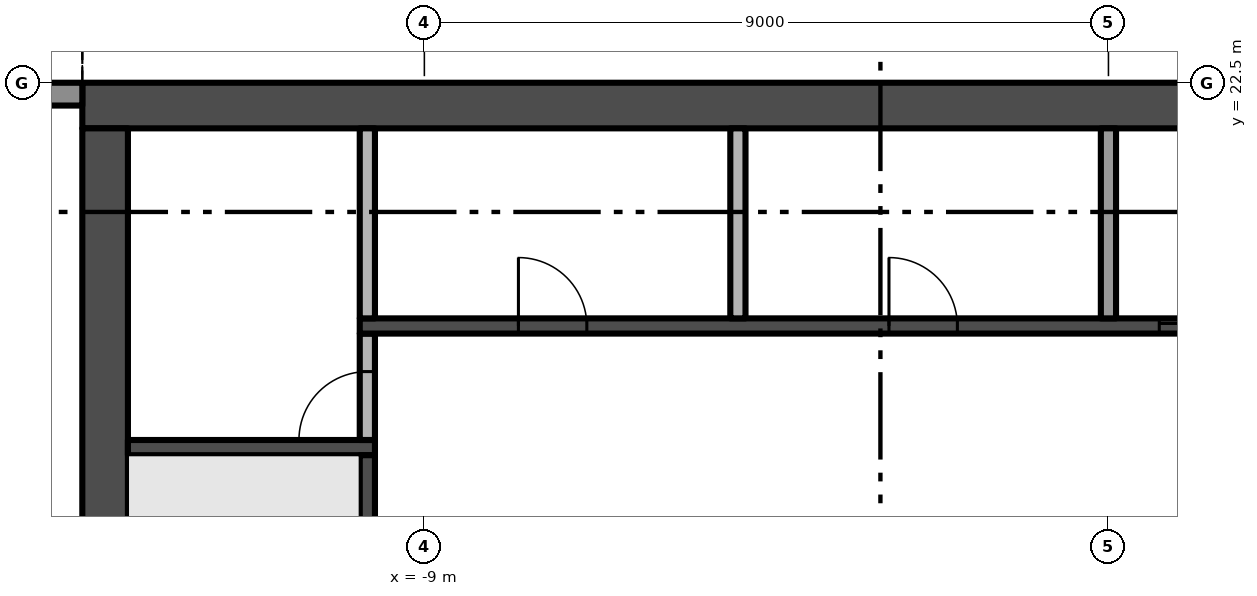
"""IFC4 building model, lengths in metres.
Left out: names, types, materials, properties, quantities, classifications, styles, units other than length and angle.
Written with IfcOpenShell. Run it as: python <this file> out.ifc"""

import sys

from ifc_helpers import new_model, si_unit, direction, frame, frame_2d, origin, place, context, subcontext, project, spatial, rectangle, extrude, element, fill, save


model = new_model("IFC4")
c1 = context("Model", 3, precision=1e-05, world=origin(), true_north=direction((0.0, 1.0)))
c2 = subcontext(c1, "Body", "Model", "MODEL_VIEW")
j1 = project(units=[si_unit("LENGTHUNIT", "METRE"), si_unit("PLANEANGLEUNIT", "RADIAN")], contexts=[c1])
p1 = place(None, origin())
s1 = spatial("IfcSite", under=j1, at=p1, CompositionType="ELEMENT")
p2 = place(p1, origin())
s2 = spatial("IfcBuilding", under=s1, at=p2, CompositionType="ELEMENT")
p3 = place(p2, frame((0.0, 0.0, 207.2)))
s3 = spatial("IfcBuildingStorey", under=s2, at=p3, CompositionType="ELEMENT", Elevation=207.2)
p4 = place(p3, frame((13.5, 22.2, -0.3), z_axis=(0.0, 0.0, 1.0), x_axis=(-1.0, 0.0, 0.0)))
e1 = element("IfcWall", 1, at=p4, inside=s3, PredefinedType="SHEAR", context=c2, shape_type="SweptSolid", body=[
    extrude(rectangle(XDim=27.0, YDim=0.6, at=frame_2d((13.5, 0.0))), origin(), (0.0, 0.0, 1.0), 3.8),
])
p5 = place(p3, frame((-13.2, 21.9, -0.3), z_axis=(0.0, 0.0, 1.0), x_axis=(0.0, -1.0, 0.0)))
e2 = element("IfcWall", 2, at=p5, inside=s3, PredefinedType="SHEAR", context=c2, shape_type="SweptSolid", body=[
    extrude(rectangle(XDim=16.8, YDim=0.6, at=frame_2d((8.4, 0.0))), origin(), (0.0, 0.0, 1.0), 3.8),
])
p6 = place(p5, frame((9.3, 0.0, 0.3)))
e3 = element("IfcOpeningElement", 3, at=p6, cuts=e2, PredefinedType="OPENING", context=c2, shape_type="SweptSolid", body=[
    extrude(rectangle(XDim=1.2, YDim=2.2, at=frame_2d((0.6, 1.1))), frame((0.0, 0.31, 0.0), z_axis=(0.0, -1.0, 0.0), x_axis=(1.0, 0.0, 0.0)), (0.0, 0.0, 1.0), 0.62),
])
p7 = place(p3, frame((-17.5, 22.35, 0.0), z_axis=(0.0, 0.0, 1.0), x_axis=(1.0, 0.0, 0.0)))
e4 = element("IfcWall", 4, at=p7, inside=s3, PredefinedType="SOLIDWALL", context=c2, shape_type="SweptSolid", body=[
    extrude(rectangle(XDim=4.0, YDim=0.3, at=frame_2d((2.0, 0.0))), origin(), (0.0, 0.0, 1.0), 3.5),
])
p8 = place(p7, frame((0.3, 0.0, 0.45)))
e5 = element("IfcOpeningElement", 5, at=p8, cuts=e4, PredefinedType="OPENING", context=c2, shape_type="SweptSolid", body=[
    extrude(rectangle(XDim=3.075, YDim=2.65, at=frame_2d((1.538, 1.325))), frame((0.0, 0.16, 0.0), z_axis=(0.0, -1.0, 0.0), x_axis=(1.0, 0.0, 0.0)), (0.0, 0.0, 1.0), 0.32),
])
p9 = place(p3, frame((-12.9, 17.7, 0.0), z_axis=(0.0, 0.0, 1.0), x_axis=(1.0, 0.0, 0.0)))
e6 = element("IfcWall", 6, at=p9, inside=s3, PredefinedType="SHEAR", context=c2, shape_type="SweptSolid", body=[
    extrude(rectangle(XDim=3.25, YDim=0.2, at=frame_2d((1.625, 0.0))), origin(), (0.0, 0.0, 1.0), 3.5),
])
p10 = place(p3, frame((-9.75, 16.1, 0.0), z_axis=(0.0, 0.0, 1.0), x_axis=(0.0, 1.0, 0.0)))
e7 = element("IfcWall", 7, at=p10, inside=s3, PredefinedType="SHEAR", context=c2, shape_type="SweptSolid", body=[
    extrude(rectangle(XDim=1.5, YDim=0.2, at=frame_2d((0.75, 0.0))), origin(), (0.0, 0.0, 1.0), 3.5),
])
p11 = place(p3, frame((-9.75, 17.8, 0.0), z_axis=(0.0, 0.0, 1.0), x_axis=(0.0, 1.0, 0.0)))
e8 = element("IfcWall", 8, at=p11, inside=s3, PredefinedType="PARTITIONING", context=c2, shape_type="SweptSolid", body=[
    extrude(rectangle(XDim=1.4, YDim=0.2, at=frame_2d((0.7, 0.0))), origin(), (0.0, 0.0, 1.0), 3.5),
])
p12 = place(p11, origin())
e9 = element("IfcOpeningElement", 9, at=p12, cuts=e8, PredefinedType="OPENING", context=c2, shape_type="SweptSolid", body=[
    extrude(rectangle(XDim=0.9, YDim=2.1, at=frame_2d((0.45, 1.05))), frame((0.0, 0.11, 0.0), z_axis=(0.0, -1.0, 0.0), x_axis=(1.0, 0.0, 0.0)), (0.0, 0.0, 1.0), 0.22),
])
p13 = place(p3, frame((-9.85, 19.3, 0.0), z_axis=(0.0, 0.0, 1.0), x_axis=(1.0, 0.0, 0.0)))
e10 = element("IfcWall", 10, at=p13, inside=s3, PredefinedType="SHEAR", context=c2, shape_type="SweptSolid", body=[
    extrude(rectangle(XDim=19.7, YDim=0.2, at=frame_2d((9.85, 0.0))), origin(), (0.0, 0.0, 1.0), 3.5),
])
p14 = place(p13, frame((10.519, 0.0, 0.0)))
e11 = element("IfcOpeningElement", 11, at=p14, cuts=e10, PredefinedType="OPENING", context=c2, shape_type="SweptSolid", body=[
    extrude(rectangle(XDim=1.1, YDim=2.1, at=frame_2d((0.55, 1.05))), frame((0.0, 0.11, 0.0), z_axis=(0.0, -1.0, 0.0), x_axis=(1.0, 0.0, 0.0)), (0.0, 0.0, 1.0), 0.22),
])
p15 = place(p13, frame((12.956, 0.0, 0.0)))
e12 = element("IfcOpeningElement", 12, at=p15, cuts=e10, PredefinedType="OPENING", context=c2, shape_type="SweptSolid", body=[
    extrude(rectangle(XDim=1.1, YDim=2.1, at=frame_2d((0.55, 1.05))), frame((0.0, 0.11, 0.0), z_axis=(0.0, -1.0, 0.0), x_axis=(1.0, 0.0, 0.0)), (0.0, 0.0, 1.0), 0.22),
])
p16 = place(p13, frame((15.394, 0.0, 0.0)))
e13 = element("IfcOpeningElement", 13, at=p16, cuts=e10, PredefinedType="OPENING", context=c2, shape_type="SweptSolid", body=[
    extrude(rectangle(XDim=1.1, YDim=2.1, at=frame_2d((0.55, 1.05))), frame((0.0, 0.11, 0.0), z_axis=(0.0, -1.0, 0.0), x_axis=(1.0, 0.0, 0.0)), (0.0, 0.0, 1.0), 0.22),
])
p17 = place(p13, frame((17.831, 0.0, 0.0)))
e14 = element("IfcOpeningElement", 14, at=p17, cuts=e10, PredefinedType="OPENING", context=c2, shape_type="SweptSolid", body=[
    extrude(rectangle(XDim=1.1, YDim=2.1, at=frame_2d((0.55, 1.05))), frame((0.0, 0.11, 0.0), z_axis=(0.0, -1.0, 0.0), x_axis=(1.0, 0.0, 0.0)), (0.0, 0.0, 1.0), 0.22),
])
p18 = place(p13, frame((2.087, 0.0, 0.0)))
e15 = element("IfcOpeningElement", 15, at=p18, cuts=e10, PredefinedType="OPENING", context=c2, shape_type="SweptSolid", body=[
    extrude(rectangle(XDim=0.9, YDim=2.1, at=frame_2d((0.45, 1.05))), frame((0.0, 0.11, 0.0), z_axis=(0.0, -1.0, 0.0), x_axis=(1.0, 0.0, 0.0)), (0.0, 0.0, 1.0), 0.22),
])
p19 = place(p13, frame((6.963, 0.0, 0.0)))
e16 = element("IfcOpeningElement", 16, at=p19, cuts=e10, PredefinedType="OPENING", context=c2, shape_type="SweptSolid", body=[
    extrude(rectangle(XDim=0.9, YDim=2.1, at=frame_2d((0.45, 1.05))), frame((0.0, 0.11, 0.0), z_axis=(0.0, -1.0, 0.0), x_axis=(1.0, 0.0, 0.0)), (0.0, 0.0, 1.0), 0.22),
])
for number, where, z_axis, x_axis in (
    (17, (-9.75, 19.4, 0.0), (0.0, 0.0, 1.0), (0.0, 1.0, 0.0)),
    (18, (-4.875, 19.4, 0.0), (0.0, 0.0, 1.0), (0.0, 1.0, 0.0)),
    (19, (0.0, 19.4, 0.0), (0.0, 0.0, 1.0), (0.0, 1.0, 0.0)),
):
    element("IfcWall", number, at=place(p3, frame(where, z_axis=z_axis, x_axis=x_axis)), inside=s3, PredefinedType="PARTITIONING", context=c2, shape_type="SweptSolid", body=[
        extrude(rectangle(XDim=2.5, YDim=0.2, at=frame_2d((1.25, 0.0))), origin(), (0.0, 0.0, 1.0), 3.5),
    ])
p20 = place(p14, origin())
e20 = element("IfcDoor", 20, at=p20, inside=s3, OperationType="SLIDING_TO_RIGHT", PredefinedType="DOOR", context=c2, shape_type="SweptSolid", body=[
    extrude(rectangle(XDim=1.1, YDim=2.1, at=frame_2d((0.55, 1.05))), frame((0.0, 0.025, 0.0), z_axis=(0.0, -1.0, 0.0), x_axis=(1.0, 0.0, 0.0)), (0.0, 0.0, 1.0), 0.05),
])
fill(e11, e20)
p21 = place(p12, origin())
e21 = element("IfcDoor", 21, at=p21, inside=s3, OperationType="SINGLE_SWING_LEFT", PredefinedType="DOOR", context=c2, shape_type="SweptSolid", body=[
    extrude(rectangle(XDim=0.9, YDim=2.1, at=frame_2d((0.45, 1.05))), frame((0.0, 0.025, 0.0), z_axis=(0.0, -1.0, 0.0), x_axis=(1.0, 0.0, 0.0)), (0.0, 0.0, 1.0), 0.05),
])
fill(e9, e21)
p22 = place(p18, origin())
e22 = element("IfcDoor", 22, at=p22, inside=s3, OperationType="SINGLE_SWING_LEFT", PredefinedType="DOOR", context=c2, shape_type="SweptSolid", body=[
    extrude(rectangle(XDim=0.9, YDim=2.1, at=frame_2d((0.45, 1.05))), frame((0.0, 0.025, 0.0), z_axis=(0.0, -1.0, 0.0), x_axis=(1.0, 0.0, 0.0)), (0.0, 0.0, 1.0), 0.05),
])
fill(e15, e22)
p23 = place(p19, origin())
e23 = element("IfcDoor", 23, at=p23, inside=s3, OperationType="SINGLE_SWING_LEFT", PredefinedType="DOOR", context=c2, shape_type="SweptSolid", body=[
    extrude(rectangle(XDim=0.9, YDim=2.1, at=frame_2d((0.45, 1.05))), frame((0.0, 0.025, 0.0), z_axis=(0.0, -1.0, 0.0), x_axis=(1.0, 0.0, 0.0)), (0.0, 0.0, 1.0), 0.05),
])
fill(e16, e23)
save(model, sys.argv[1])
